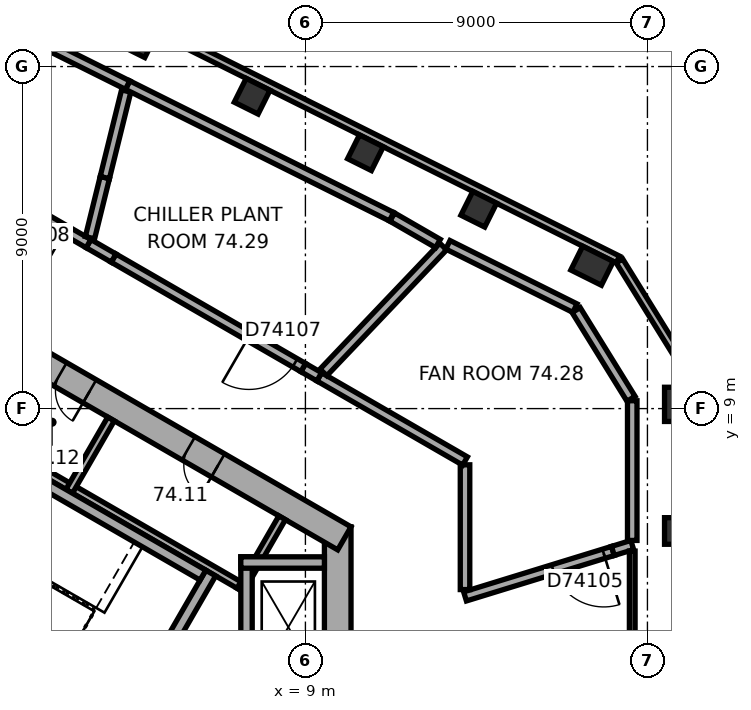
"""IFC4 building model, lengths in metres.
Left out: names, types, materials, properties, quantities, classifications, styles, units other than length and angle.
Written with IfcOpenShell. Run it as: python <this file> out.ifc"""

import sys

from ifc_helpers import new_model, si_unit, direction, frame, frame_2d, origin, origin_2d, place, context, subcontext, project, spatial, rectangle, extrude, element, fill, save


model = new_model("IFC4")
c1 = context("Model", 3, precision=1e-05, world=origin(), true_north=direction((0.0, 1.0)))
c2 = subcontext(c1, "Body", "Model", "MODEL_VIEW")
j1 = project(units=[si_unit("LENGTHUNIT", "METRE"), si_unit("PLANEANGLEUNIT", "RADIAN")], contexts=[c1])
p1 = place(None, origin())
s1 = spatial("IfcSite", under=j1, at=p1, CompositionType="ELEMENT")
p2 = place(p1, origin())
s2 = spatial("IfcBuilding", under=s1, at=p2, CompositionType="ELEMENT")
p3 = place(p2, frame((0.0, 0.0, 300.5)))
s3 = spatial("IfcBuildingStorey", under=s2, at=p3, CompositionType="ELEMENT", Elevation=300.5)
p4 = place(p3, frame((18.8, 5.78, 0.0), z_axis=(0.0, 0.0, 1.0), x_axis=(0.0, 1.0, 0.0)))
e1 = element("IfcColumn", 1, at=p4, inside=s3, PredefinedType="COLUMN", context=c2, shape_type="SweptSolid", body=[
    extrude(rectangle(XDim=0.7, YDim=0.7, at=origin_2d()), origin(), (0.0, 0.0, 1.0), 4.5),
])
for number, where, z_axis, x_axis in (
    (2, (18.8, 9.112, 0.0), (0.0, 0.0, 1.0), (0.0, 1.0, 0.0)),
    (3, (16.543, 12.759, 0.0), (0.0, 0.0, 1.0), (-0.895, 0.446, 0.0)),
):
    element("IfcColumn", number, at=place(p3, frame(where, z_axis=z_axis, x_axis=x_axis)), inside=s3, PredefinedType="COLUMN", context=c2, shape_type="SweptSolid", body=[
        extrude(rectangle(XDim=0.9, YDim=0.7, at=origin_2d()), origin(), (0.0, 0.0, 1.0), 4.5),
    ])
for number, where, z_axis, x_axis in (
    (4, (13.561, 14.246, 0.0), (0.0, 0.0, 1.0), (-0.895, 0.446, 0.0)),
    (5, (10.58, 15.732, 0.0), (0.0, 0.0, 1.0), (-0.895, 0.446, 0.0)),
    (6, (7.598, 17.219, 0.0), (0.0, 0.0, 1.0), (-0.895, 0.446, 0.0)),
    (7, (4.616, 18.706, 0.0), (0.0, 0.0, 1.0), (-0.895, 0.446, 0.0)),
):
    element("IfcColumn", number, at=place(p3, frame(where, z_axis=z_axis, x_axis=x_axis)), inside=s3, PredefinedType="COLUMN", context=c2, shape_type="SweptSolid", body=[
        extrude(rectangle(XDim=0.7, YDim=0.7, at=origin_2d()), origin(), (0.0, 0.0, 1.0), 4.5),
    ])
p5 = place(p3, frame((9.85, -5.889, 0.0), z_axis=(0.0, 0.0, 1.0), x_axis=(0.0, 1.0, 0.0)))
e8 = element("IfcWall", 8, at=p5, inside=s3, PredefinedType="SHEAR", context=c2, shape_type="SweptSolid", body=[
    extrude(rectangle(XDim=11.778, YDim=0.7, at=frame_2d((5.889, 0.0))), origin(), (0.0, 0.0, 1.0), 4.5),
])
p6 = place(p5, frame((6.089, 0.0, 0.0)))
e9 = element("IfcOpeningElement", 9, at=p6, cuts=e8, PredefinedType="OPENING", context=c2, shape_type="SweptSolid", body=[
    extrude(rectangle(XDim=1.5, YDim=2.1, at=frame_2d((0.75, 1.05))), frame((0.0, 0.36, 0.0), z_axis=(0.0, -1.0, 0.0), x_axis=(1.0, 0.0, 0.0)), (0.0, 0.0, 1.0), 0.72),
])
p7 = place(p5, frame((2.939, 0.0, 0.0)))
e10 = element("IfcOpeningElement", 10, at=p7, cuts=e8, PredefinedType="OPENING", context=c2, shape_type="SweptSolid", body=[
    extrude(rectangle(XDim=0.9, YDim=2.1, at=frame_2d((0.45, 1.05))), frame((0.0, 0.36, 0.0), z_axis=(0.0, -1.0, 0.0), x_axis=(1.0, 0.0, 0.0)), (0.0, 0.0, 1.0), 0.72),
])
p8 = place(p3, frame((10.025, 5.586, 0.0), z_axis=(0.0, 0.0, 1.0), x_axis=(-0.866026453023, 0.499998182661, 0.0)))
e11 = element("IfcWall", 11, at=p8, inside=s3, PredefinedType="SHEAR", context=c2, shape_type="SweptSolid", body=[
    extrude(rectangle(XDim=11.778, YDim=0.7, at=frame_2d((5.889, 0.0))), origin(), (0.0, 0.0, 1.0), 4.5),
])
p9 = place(p8, frame((3.839, 0.0, 0.0)))
e12 = element("IfcOpeningElement", 12, at=p9, cuts=e11, PredefinedType="OPENING", context=c2, shape_type="SweptSolid", body=[
    extrude(rectangle(XDim=0.9, YDim=2.1, at=frame_2d((0.45, 1.05))), frame((0.0, 0.36, 0.0), z_axis=(0.0, -1.0, 0.0), x_axis=(1.0, 0.0, 0.0)), (0.0, 0.0, 1.0), 0.72),
])
p10 = place(p8, frame((7.739, 0.0, 0.0)))
e13 = element("IfcOpeningElement", 13, at=p10, cuts=e11, PredefinedType="OPENING", context=c2, shape_type="SweptSolid", body=[
    extrude(rectangle(XDim=0.9, YDim=2.1, at=frame_2d((0.45, 1.05))), frame((0.0, 0.36, 0.0), z_axis=(0.0, -1.0, 0.0), x_axis=(1.0, 0.0, 0.0)), (0.0, 0.0, 1.0), 0.72),
])
p11 = place(p3, frame((19.235, 9.7, 0.0), z_axis=(0.0, 0.0, 1.0), x_axis=(-0.526233475464, 0.850340125656, 0.0)))
e14 = element("IfcWall", 14, at=p11, inside=s3, PredefinedType="STANDARD", context=c2, shape_type="SweptSolid", body=[
    extrude(rectangle(XDim=3.747, YDim=0.2, at=frame_2d((1.874, 0.0))), origin(), (0.0, 0.0, 1.0), 4.5),
])
p12 = place(p3, frame((17.223, 12.923, 0.0), z_axis=(0.0, 0.0, 1.0), x_axis=(-0.894930561148, 0.44620543556, 0.0)))
e15 = element("IfcWall", 15, at=p12, inside=s3, PredefinedType="STANDARD", context=c2, shape_type="SweptSolid", body=[
    extrude(rectangle(XDim=17.731, YDim=0.2, at=frame_2d((8.866, 0.0))), origin(), (0.0, 0.0, 1.0), 4.5),
])
p13 = place(p3, frame((7.424, 4.259, 0.0), z_axis=(0.0, 0.0, 1.0), x_axis=(-0.866026010844, 0.49999894854, 0.0)))
e16 = element("IfcWall", 16, at=p13, inside=s3, PredefinedType="PARTITIONING", context=c2, shape_type="SweptSolid", body=[
    extrude(rectangle(XDim=8.0, YDim=0.2, at=frame_2d((4.0, 0.0))), origin(), (0.0, 0.0, 1.0), 4.2),
])
for number, where, z_axis, x_axis in (
    (17, (7.287, 4.222, 0.0), (0.0, 0.0, 1.0), (0.5, 0.866, 0.0)),
    (18, (2.784, 6.822, 0.0), (0.0, 0.0, 1.0), (0.5, 0.866, 0.0)),
):
    element("IfcWall", number, at=place(p3, frame(where, z_axis=z_axis, x_axis=x_axis)), inside=s3, PredefinedType="PARTITIONING", context=c2, shape_type="SweptSolid", body=[
        extrude(rectangle(XDim=2.2, YDim=0.2, at=frame_2d((1.1, 0.0))), origin(), (0.0, 0.0, 1.0), 4.2),
    ])
p14 = place(p3, frame((4.158, 0.602, 0.0), z_axis=(0.0, 0.0, 1.0), x_axis=(0.499977259774, 0.866038532462, 0.0)))
e19 = element("IfcWall", 19, at=p14, inside=s3, PredefinedType="SHEAR", context=c2, shape_type="SweptSolid", body=[
    extrude(rectangle(XDim=4.7, YDim=0.3, at=frame_2d((2.35, 0.0))), origin(), (0.0, 0.0, 1.0), 4.5),
])
p15 = place(p14, frame((0.8, 0.0, 0.0)))
e20 = element("IfcOpeningElement", 20, at=p15, cuts=e19, PredefinedType="OPENING", context=c2, shape_type="SweptSolid", body=[
    extrude(rectangle(XDim=1.2, YDim=2.1, at=frame_2d((0.6, 1.05))), frame((0.0, 0.16, 0.0), z_axis=(0.0, -1.0, 0.0), x_axis=(1.0, 0.0, 0.0)), (0.0, 0.0, 1.0), 0.32),
])
for number, where, z_axis, x_axis in (
    (21, (4.103, 0.807, 0.0), (0.0, 0.0, 1.0), (-0.866, 0.5, 0.0)),
    (22, (6.303, 4.617, 0.0), (0.0, 0.0, 1.0), (-0.866, 0.5, 0.0)),
):
    element("IfcWall", number, at=place(p3, frame(where, z_axis=z_axis, x_axis=x_axis)), inside=s3, PredefinedType="SHEAR", context=c2, shape_type="SweptSolid", body=[
        extrude(rectangle(XDim=7.06, YDim=0.3, at=frame_2d((3.53, 0.0))), origin(), (0.0, 0.0, 1.0), 4.5),
    ])
p16 = place(p3, frame((7.45, 1.75, 0.0), z_axis=(0.0, 0.0, 1.0), x_axis=(0.0, 1.0, 0.0)))
e23 = element("IfcWall", 23, at=p16, inside=s3, PredefinedType="SHEAR", context=c2, shape_type="SweptSolid", body=[
    extrude(rectangle(XDim=3.35, YDim=0.3, at=frame_2d((1.675, 0.0))), origin(), (0.0, 0.0, 1.0), 4.2),
])
p17 = place(p3, frame((7.3, 4.95, 0.0), z_axis=(0.0, 0.0, 1.0), x_axis=(1.0, 0.0, 0.0)))
e24 = element("IfcWall", 24, at=p17, inside=s3, PredefinedType="SHEAR", context=c2, shape_type="SweptSolid", body=[
    extrude(rectangle(XDim=2.2, YDim=0.3, at=frame_2d((1.1, 0.0))), origin(), (0.0, 0.0, 1.0), 4.2),
])
p18 = place(p3, frame((17.091, 5.254, 0.0), z_axis=(0.0, 0.0, 1.0), x_axis=(-0.955846412472, -0.293866697271, 0.0)))
e25 = element("IfcWall", 25, at=p18, inside=s3, PredefinedType="SOLIDWALL", context=c2, shape_type="SweptSolid", body=[
    extrude(rectangle(XDim=4.071, YDim=0.25, at=frame_2d((2.035, 0.0))), origin(), (0.0, 0.0, 1.0), 3.5),
])
p19 = place(p18, frame((0.25, 0.0, 0.0)))
e26 = element("IfcOpeningElement", 26, at=p19, cuts=e25, PredefinedType="OPENING", context=c2, shape_type="SweptSolid", body=[
    extrude(rectangle(XDim=1.4, YDim=2.1, at=frame_2d((0.7, 1.05))), frame((0.0, 0.135, 0.0), z_axis=(0.0, -1.0, 0.0), x_axis=(1.0, 0.0, 0.0)), (0.0, 0.0, 1.0), 0.27),
])
p20 = place(p3, frame((17.091, 5.254, 0.0), z_axis=(0.0, 0.0, 1.0), x_axis=(0.955848367703, 0.293860337505, 0.0)))
e27 = element("IfcWall", 27, at=p20, inside=s3, PredefinedType="SOLIDWALL", context=c2, shape_type="SweptSolid", body=[
    extrude(rectangle(XDim=0.532, YDim=0.25, at=frame_2d((0.266, 0.0))), origin(), (0.0, 0.0, 1.0), 3.5),
])
p21 = place(p3, frame((17.6, 5.251, 0.0), z_axis=(0.0, 0.0, 1.0), x_axis=(0.0, -1.0, 0.0)))
e28 = element("IfcWall", 28, at=p21, inside=s3, PredefinedType="PARTITIONING", context=c2, shape_type="SweptSolid", body=[
    extrude(rectangle(XDim=12.316, YDim=0.15, at=frame_2d((6.158, 0.0))), origin(), (0.0, 0.0, 1.0), 4.2),
])
p22 = place(p3, frame((13.2, 7.521, 0.0), z_axis=(0.0, 0.0, 1.0), x_axis=(0.0, -1.0, 0.0)))
e29 = element("IfcWall", 29, at=p22, inside=s3, PredefinedType="SOLIDWALL", context=c2, shape_type="SweptSolid", body=[
    extrude(rectangle(XDim=3.283, YDim=0.25, at=frame_2d((1.642, 0.0))), origin(), (0.0, 0.0, 1.0), 4.2),
])
p23 = place(p3, frame((13.2, 7.621, 0.0), z_axis=(0.0, 0.0, 1.0), x_axis=(-0.866036909293, 0.499980071345, 0.0)))
e30 = element("IfcWall", 30, at=p23, inside=s3, PredefinedType="SOLIDWALL", context=c2, shape_type="SweptSolid", body=[
    extrude(rectangle(XDim=4.43, YDim=0.25, at=frame_2d((2.215, 0.0))), origin(), (0.0, 0.0, 1.0), 4.2),
])
p24 = place(p3, frame((17.6, 9.207, 0.0), z_axis=(0.0, 0.0, 1.0), x_axis=(0.0, -1.0, 0.0)))
e31 = element("IfcWall", 31, at=p24, inside=s3, PredefinedType="SOLIDWALL", context=c2, shape_type="SweptSolid", body=[
    extrude(rectangle(XDim=3.676, YDim=0.25, at=frame_2d((1.838, 0.0))), origin(), (0.0, 0.0, 1.0), 4.2),
])
p25 = place(p3, frame((8.943, 10.079, 0.0), z_axis=(0.0, 0.0, 1.0), x_axis=(0.865976326759, -0.500084994269, 0.0)))
e32 = element("IfcWall", 32, at=p25, inside=s3, PredefinedType="SOLIDWALL", context=c2, shape_type="SweptSolid", body=[
    extrude(rectangle(XDim=0.486, YDim=0.25, at=frame_2d((0.243, 0.0))), origin(), (0.0, 0.0, 1.0), 4.2),
])
p26 = place(p3, frame((16.124, 11.592, 0.0), z_axis=(0.0, 0.0, 1.0), x_axis=(0.526140278791, -0.850397793408, 0.0)))
e33 = element("IfcWall", 33, at=p26, inside=s3, PredefinedType="SOLIDWALL", context=c2, shape_type="SweptSolid", body=[
    extrude(rectangle(XDim=2.745, YDim=0.25, at=frame_2d((1.373, 0.0))), origin(), (0.0, 0.0, 1.0), 4.2),
])
p27 = place(p3, frame((3.952, 12.96, 0.0), z_axis=(0.0, 0.0, 1.0), x_axis=(0.866036720167, -0.499980398938, 0.0)))
e34 = element("IfcWall", 34, at=p27, inside=s3, PredefinedType="SOLIDWALL", context=c2, shape_type="SweptSolid", body=[
    extrude(rectangle(XDim=5.762, YDim=0.25, at=frame_2d((2.881, 0.0))), origin(), (0.0, 0.0, 1.0), 4.2),
])
p28 = place(p27, frame((4.112, 0.0, 0.0)))
e35 = element("IfcOpeningElement", 35, at=p28, cuts=e34, PredefinedType="OPENING", context=c2, shape_type="SweptSolid", body=[
    extrude(rectangle(XDim=1.4, YDim=2.1, at=frame_2d((0.7, 1.05))), frame((0.0, 0.135, 0.0), z_axis=(0.0, -1.0, 0.0), x_axis=(1.0, 0.0, 0.0)), (0.0, 0.0, 1.0), 0.27),
])
p29 = place(p3, frame((3.952, 12.96, 0.0), z_axis=(0.0, 0.0, 1.0), x_axis=(-0.865966824893, 0.500101447894, 0.0)))
e36 = element("IfcWall", 36, at=p29, inside=s3, PredefinedType="SOLIDWALL", context=c2, shape_type="SweptSolid", body=[
    extrude(rectangle(XDim=0.762, YDim=0.25, at=frame_2d((0.381, 0.0))), origin(), (0.0, 0.0, 1.0), 4.2),
])
p30 = place(p3, frame((12.626, 13.264, 0.0), z_axis=(0.0, 0.0, 1.0), x_axis=(-0.689459162518, -0.724324556549, 0.0)))
e37 = element("IfcWall", 37, at=p30, inside=s3, PredefinedType="SOLIDWALL", context=c2, shape_type="SweptSolid", body=[
    extrude(rectangle(XDim=4.573, YDim=0.25, at=frame_2d((2.286, 0.0))), origin(), (0.0, 0.0, 1.0), 4.2),
])
p31 = place(p3, frame((12.749, 13.31, 0.0), z_axis=(0.0, 0.0, 1.0), x_axis=(0.894949406944, -0.446167635549, 0.0)))
e38 = element("IfcWall", 38, at=p31, inside=s3, PredefinedType="SOLIDWALL", context=c2, shape_type="SweptSolid", body=[
    extrude(rectangle(XDim=3.736, YDim=0.25, at=frame_2d((1.868, 0.0))), origin(), (0.0, 0.0, 1.0), 4.2),
])
p32 = place(p3, frame((3.292, 13.341, 0.0), z_axis=(0.0, 0.0, 1.0), x_axis=(-0.866030726613, 0.499990780478, 0.0)))
e39 = element("IfcWall", 39, at=p32, inside=s3, PredefinedType="SOLIDWALL", context=c2, shape_type="SweptSolid", body=[
    extrude(rectangle(XDim=3.702, YDim=0.25, at=frame_2d((1.851, 0.0))), origin(), (0.0, 0.0, 1.0), 4.2),
])
p33 = place(p32, frame((0.7, 0.0, 0.0)))
e40 = element("IfcOpeningElement", 40, at=p33, cuts=e39, PredefinedType="OPENING", context=c2, shape_type="SweptSolid", body=[
    extrude(rectangle(XDim=1.4, YDim=2.1, at=frame_2d((0.7, 1.05))), frame((0.0, 0.135, 0.0), z_axis=(0.0, -1.0, 0.0), x_axis=(1.0, 0.0, 0.0)), (0.0, 0.0, 1.0), 0.27),
])
p34 = place(p3, frame((3.331, 13.496, 0.0), z_axis=(0.0, 0.0, 1.0), x_axis=(0.239540217135, 0.970886442575, 0.0)))
e41 = element("IfcWall", 41, at=p34, inside=s3, PredefinedType="SOLIDWALL", context=c2, shape_type="SweptSolid", body=[
    extrude(rectangle(XDim=1.631, YDim=0.25, at=frame_2d((0.815, 0.0))), origin(), (0.0, 0.0, 1.0), 3.5),
])
p35 = place(p3, frame((11.284, 14.039, 0.0), z_axis=(0.0, 0.0, 1.0), x_axis=(0.866062775822, -0.499935264145, 0.0)))
e42 = element("IfcWall", 42, at=p35, inside=s3, PredefinedType="SOLIDWALL", context=c2, shape_type="SweptSolid", body=[
    extrude(rectangle(XDim=1.39, YDim=0.25, at=frame_2d((0.695, 0.0))), origin(), (0.0, 0.0, 1.0), 4.2),
])
p36 = place(p3, frame((3.721, 15.08, 0.0), z_axis=(0.0, 0.0, 1.0), x_axis=(0.23957025728, 0.970879030481, 0.0)))
e43 = element("IfcWall", 43, at=p36, inside=s3, PredefinedType="SOLIDWALL", context=c2, shape_type="SweptSolid", body=[
    extrude(rectangle(XDim=2.345, YDim=0.25, at=frame_2d((1.172, 0.0))), origin(), (0.0, 0.0, 1.0), 3.5),
])
p37 = place(p3, frame((4.322, 17.511, 0.0), z_axis=(0.0, 0.0, 1.0), x_axis=(0.894948820766, -0.446168811337, 0.0)))
e44 = element("IfcWall", 44, at=p37, inside=s3, PredefinedType="SOLIDWALL", context=c2, shape_type="SweptSolid", body=[
    extrude(rectangle(XDim=7.76, YDim=0.25, at=frame_2d((3.88, 0.0))), origin(), (0.0, 0.0, 1.0), 4.2),
])
p38 = place(p3, frame((0.968, 19.184, 0.0), z_axis=(0.0, 0.0, 1.0), x_axis=(0.894895708384, -0.446275331063, 0.0)))
e45 = element("IfcWall", 45, at=p38, inside=s3, PredefinedType="SOLIDWALL", context=c2, shape_type="SweptSolid", body=[
    extrude(rectangle(XDim=3.748, YDim=0.25, at=frame_2d((1.874, 0.0))), origin(), (0.0, 0.0, 1.0), 4.2),
])
p39 = place(p9, origin())
e46 = element("IfcDoor", 46, at=p39, inside=s3, OperationType="SINGLE_SWING_LEFT", PredefinedType="DOOR", context=c2, shape_type="SweptSolid", body=[
    extrude(rectangle(XDim=0.9, YDim=2.1, at=frame_2d((0.45, 1.05))), frame((0.0, 0.025, 0.0), z_axis=(0.0, -1.0, 0.0), x_axis=(1.0, 0.0, 0.0)), (0.0, 0.0, 1.0), 0.05),
])
fill(e12, e46)
p40 = place(p10, origin())
e47 = element("IfcDoor", 47, at=p40, inside=s3, OperationType="SINGLE_SWING_LEFT", PredefinedType="DOOR", context=c2, shape_type="SweptSolid", body=[
    extrude(rectangle(XDim=0.9, YDim=2.1, at=frame_2d((0.45, 1.05))), frame((0.0, 0.025, 0.0), z_axis=(0.0, -1.0, 0.0), x_axis=(1.0, 0.0, 0.0)), (0.0, 0.0, 1.0), 0.05),
])
fill(e13, e47)
p41 = place(p19, origin())
e48 = element("IfcDoor", 48, at=p41, inside=s3, OperationType="SINGLE_SWING_LEFT", PredefinedType="DOOR", context=c2, shape_type="SweptSolid", body=[
    extrude(rectangle(XDim=1.4, YDim=2.1, at=frame_2d((0.7, 1.05))), frame((0.0, 0.025, 0.0), z_axis=(0.0, -1.0, 0.0), x_axis=(1.0, 0.0, 0.0)), (0.0, 0.0, 1.0), 0.05),
])
fill(e26, e48)
p42 = place(p28, origin())
e49 = element("IfcDoor", 49, at=p42, inside=s3, OperationType="SINGLE_SWING_LEFT", PredefinedType="DOOR", context=c2, shape_type="SweptSolid", body=[
    extrude(rectangle(XDim=1.4, YDim=2.1, at=frame_2d((0.7, 1.05))), frame((0.0, 0.025, 0.0), z_axis=(0.0, -1.0, 0.0), x_axis=(1.0, 0.0, 0.0)), (0.0, 0.0, 1.0), 0.05),
])
fill(e35, e49)
p43 = place(p33, origin())
e50 = element("IfcDoor", 50, at=p43, inside=s3, OperationType="SINGLE_SWING_LEFT", PredefinedType="DOOR", context=c2, shape_type="SweptSolid", body=[
    extrude(rectangle(XDim=1.4, YDim=2.1, at=frame_2d((0.7, 1.05))), frame((0.0, 0.025, 0.0), z_axis=(0.0, -1.0, 0.0), x_axis=(1.0, 0.0, 0.0)), (0.0, 0.0, 1.0), 0.05),
])
fill(e40, e50)
save(model, sys.argv[1])
